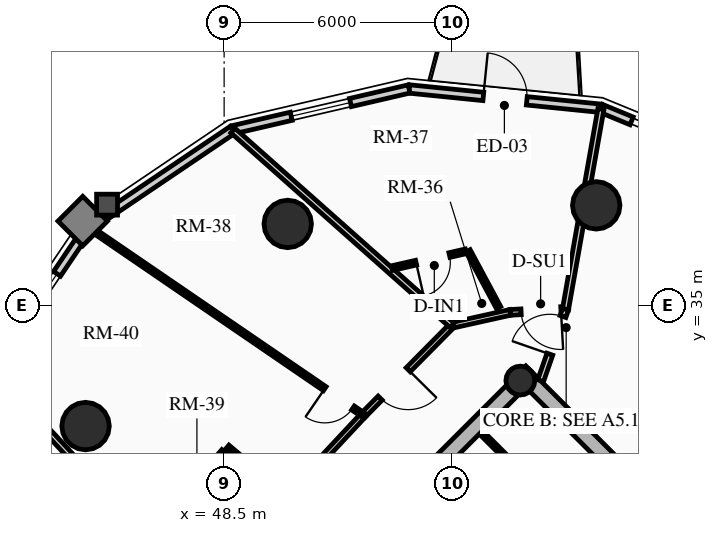
"""IFC4 building model, lengths in metres.
Left out: names, types, materials, properties, quantities, classifications, styles, units other than length and angle.
Written with IfcOpenShell. Run it as: python <this file> out.ifc"""

import sys

from ifc_helpers import new_model, si_unit, direction, frame, frame_2d, origin, origin_2d, place, context, subcontext, project, spatial, rectangle, circle, hollow_circle, extrude, source, transform, mapped, element, fill, save


model = new_model("IFC4")
c1 = context("Model", 3, precision=1e-05, world=origin(), true_north=direction((0.0, 1.0)))
c2 = subcontext(c1, "Body", "Model", "MODEL_VIEW")
j1 = project(units=[si_unit("LENGTHUNIT", "METRE"), si_unit("PLANEANGLEUNIT", "RADIAN")], contexts=[c1])
p1 = place(None, origin())
s1 = spatial("IfcSite", under=j1, at=p1, CompositionType="ELEMENT")
p2 = place(p1, origin())
s2 = spatial("IfcBuilding", under=s1, at=p2, CompositionType="ELEMENT")
p3 = place(p2, frame((0.0, 0.0, 151.6)))
s3 = spatial("IfcBuildingStorey", under=s2, at=p3, CompositionType="ELEMENT", Elevation=151.6)
p4 = place(p3, frame((66.268, 23.298, 0.0), z_axis=(0.0, 0.0, 1.0), x_axis=(-0.707106781187, 0.707106781187, 0.0)))
e1 = element("IfcWall", 1, at=p4, inside=s3, PredefinedType="SHEAR", context=c2, shape_type="SweptSolid", body=[
    extrude(rectangle(XDim=14.1, YDim=0.4, at=frame_2d((7.05, 0.0))), origin(), (0.0, 0.0, 1.0), 2.91),
])
p5 = place(p3, frame((48.873, 25.561, 0.0), z_axis=(0.0, 0.0, 1.0), x_axis=(0.707106781187, 0.707106781187, 0.0)))
e2 = element("IfcWall", 2, at=p5, inside=s3, PredefinedType="SHEAR", context=c2, shape_type="SweptSolid", body=[
    extrude(rectangle(XDim=10.7, YDim=0.4, at=frame_2d((5.35, 0.0))), origin(), (0.0, 0.0, 1.0), 2.91),
])
m1 = source(origin(), c2, "Body", "SweptSolid", [
    extrude(rectangle(XDim=1.5, YDim=2.02, at=frame_2d((0.75, 1.01))), frame((0.0, 0.21, 0.0), z_axis=(0.0, -1.0, 0.0), x_axis=(1.0, 0.0, 0.0)), (0.0, 0.0, 1.0), 0.42),
])
p6 = place(p5, frame((4.6, 0.0, 0.0)))
e3 = element("IfcOpeningElement", 3, at=p6, cuts=e2, PredefinedType="OPENING", context=c2, shape_type="MappedRepresentation", body=[
    mapped(m1, transform((0.0, 0.0, 0.0), x_axis=(1.0, 0.0, 0.0), y_axis=(0.0, 1.0, 0.0), z_axis=(0.0, 0.0, 1.0), scale=1.0)),
])
p7 = place(p3, frame((56.294, 33.024, 0.0), z_axis=(0.0, 0.0, 1.0), x_axis=(0.707106781187, 0.707106781187, 0.0)))
e4 = element("IfcColumn", 4, at=p7, inside=s3, PredefinedType="COLUMN", context=c2, shape_type="SweptSolid", body=[
    extrude(hollow_circle(Radius=0.38, WallThickness=0.032, at=origin_2d()), origin(), (0.0, 0.0, 1.0), 2.91),
])
for number, where, z_axis, x_axis in (
    (5, (58.291, 37.635, 0.0), (0.0, 0.0, 1.0), (1.0, 0.0, 0.0)),
    (6, (50.173, 37.146, 0.0), (0.0, 0.0, 1.0), (1.0, 0.0, 0.0)),
    (7, (44.854, 31.827, 0.0), (0.0, 0.0, 1.0), (1.0, 0.0, 0.0)),
):
    element("IfcColumn", number, at=place(p3, frame(where, z_axis=z_axis, x_axis=x_axis)), inside=s3, PredefinedType="USERDEFINED", context=c2, shape_type="SweptSolid", body=[
        extrude(circle(Radius=0.625, at=origin_2d()), origin(), (0.0, 0.0, 1.0), 2.91),
    ])
p8 = place(p3, frame((58.418, 40.189, 0.0), z_axis=(0.0, 0.0, 1.0), x_axis=(0.924556017656, -0.381046152345, 0.0)))
e8 = element("IfcWall", 8, at=p8, inside=s3, PredefinedType="SOLIDWALL", context=c2, shape_type="SweptSolid", body=[
    extrude(rectangle(XDim=0.87, YDim=0.22, at=frame_2d((0.435, 0.0))), origin(), (0.0, 0.0, 1.0), 2.245),
])
p9 = place(p3, frame((53.367, 40.698, 0.0), z_axis=(0.0, 0.0, 1.0), x_axis=(0.994959267396, -0.100279889424, 0.0)))
e9 = element("IfcWall", 9, at=p9, inside=s3, PredefinedType="SOLIDWALL", context=c2, shape_type="SweptSolid", body=[
    extrude(rectangle(XDim=5.076, YDim=0.22, at=frame_2d((2.538, 0.0))), origin(), (0.0, 0.0, 1.0), 2.245),
])
m2 = source(origin(), c2, "Body", "SweptSolid", [
    extrude(rectangle(XDim=1.15, YDim=2.005, at=frame_2d((0.575, 1.002))), frame((0.0, 0.12, 0.0), z_axis=(0.0, -1.0, 0.0), x_axis=(1.0, 0.0, 0.0)), (0.0, 0.0, 1.0), 0.24),
])
p10 = place(p9, frame((1.963, 0.0, 0.0)))
e10 = element("IfcOpeningElement", 10, at=p10, cuts=e9, PredefinedType="OPENING", context=c2, shape_type="MappedRepresentation", body=[
    mapped(m2, transform((0.0, 0.0, 0.0), x_axis=(1.0, 0.0, 0.0), y_axis=(0.0, 1.0, 0.0), z_axis=(0.0, 0.0, 1.0), scale=1.0)),
])
p11 = place(p3, frame((48.721, 39.622, 0.0), z_axis=(0.0, 0.0, 1.0), x_axis=(0.974206226622, 0.225659540039, 0.0)))
e11 = element("IfcWall", 11, at=p11, inside=s3, PredefinedType="SOLIDWALL", context=c2, shape_type="SweptSolid", body=[
    extrude(rectangle(XDim=4.769, YDim=0.22, at=frame_2d((2.385, 0.0))), origin(), (0.0, 0.0, 1.0), 2.245),
])
m3 = source(origin(), c2, "Body", "SweptSolid", [
    extrude(rectangle(XDim=1.6, YDim=1.3, at=frame_2d((0.8, 0.65))), frame((0.0, 0.12, 0.0), z_axis=(0.0, -1.0, 0.0), x_axis=(1.0, 0.0, 0.0)), (0.0, 0.0, 1.0), 0.24),
])
p12 = place(p11, frame((1.585, 0.0, 0.65)))
e12 = element("IfcOpeningElement", 12, at=p12, cuts=e11, PredefinedType="OPENING", context=c2, shape_type="MappedRepresentation", body=[
    mapped(m3, transform((0.0, 0.0, 0.0), x_axis=(1.0, 0.0, 0.0), y_axis=(0.0, 1.0, 0.0), z_axis=(0.0, 0.0, 1.0), scale=1.0)),
])
p13 = place(p3, frame((44.935, 37.065, 0.0), z_axis=(0.0, 0.0, 1.0), x_axis=(0.828739009952, 0.559635286042, 0.0)))
e13 = element("IfcWall", 13, at=p13, inside=s3, PredefinedType="SOLIDWALL", context=c2, shape_type="SweptSolid", body=[
    extrude(rectangle(XDim=4.569, YDim=0.22, at=frame_2d((2.284, 0.0))), origin(), (0.0, 0.0, 1.0), 2.245),
])
p14 = place(p3, frame((42.378, 33.279, 0.0), z_axis=(0.0, 0.0, 1.0), x_axis=(0.559635286042, 0.828739009952, 0.0)))
e14 = element("IfcWall", 14, at=p14, inside=s3, PredefinedType="SOLIDWALL", context=c2, shape_type="SweptSolid", body=[
    extrude(rectangle(XDim=4.569, YDim=0.22, at=frame_2d((2.284, 0.0))), origin(), (0.0, 0.0, 1.0), 2.245),
])
p15 = place(p14, frame((1.484, 0.0, 0.65)))
e15 = element("IfcOpeningElement", 15, at=p15, cuts=e14, PredefinedType="OPENING", context=c2, shape_type="MappedRepresentation", body=[
    mapped(m3, transform((0.0, 0.0, 0.0), x_axis=(1.0, 0.0, 0.0), y_axis=(0.0, 1.0, 0.0), z_axis=(0.0, 0.0, 1.0), scale=1.0)),
])
p16 = place(p3, frame((57.981, 28.941, 0.0), z_axis=(0.0, 0.0, 1.0), x_axis=(-0.707074823725, 0.707138737204, 0.0)))
e16 = element("IfcWall", 16, at=p16, inside=s3, PredefinedType="PARTITIONING", context=c2, shape_type="SweptSolid", body=[
    extrude(rectangle(XDim=3.82, YDim=0.125, at=frame_2d((1.91, 0.0))), origin(), (0.0, 0.0, 1.0), 2.675),
])
m4 = source(origin(), c2, "Body", "SweptSolid", [
    extrude(rectangle(XDim=0.9, YDim=2.005, at=frame_2d((0.45, 1.002))), frame((0.0, 0.073, 0.0), z_axis=(0.0, -1.0, 0.0), x_axis=(1.0, 0.0, 0.0)), (0.0, 0.0, 1.0), 0.145),
])
p17 = place(p16, frame((1.45, 0.0, 0.0)))
e17 = element("IfcOpeningElement", 17, at=p17, cuts=e16, PredefinedType="OPENING", context=c2, shape_type="MappedRepresentation", body=[
    mapped(m4, transform((0.0, 0.0, 0.0), x_axis=(1.0, 0.0, 0.0), y_axis=(0.0, 1.0, 0.0), z_axis=(0.0, 0.0, 1.0), scale=1.0)),
])
p18 = place(p3, frame((57.482, 34.899, 0.0), z_axis=(0.0, 0.0, 1.0), x_axis=(-0.998466026722, -0.055367801852, 0.0)))
e18 = element("IfcWall", 18, at=p18, inside=s3, PredefinedType="PARTITIONING", context=c2, shape_type="SweptSolid", body=[
    extrude(rectangle(XDim=1.455, YDim=0.15, at=frame_2d((0.728, 0.0))), origin(), (0.0, 0.0, 1.0), 2.245),
])
m5 = source(origin(), c2, "Body", "SweptSolid", [
    extrude(rectangle(XDim=1.05, YDim=2.015, at=frame_2d((0.525, 1.007))), frame((0.0, 0.085, 0.0), z_axis=(0.0, -1.0, 0.0), x_axis=(1.0, 0.0, 0.0)), (0.0, 0.0, 1.0), 0.17),
])
p19 = place(p18, frame((0.12, 0.0, 0.0)))
e19 = element("IfcOpeningElement", 19, at=p19, cuts=e18, PredefinedType="OPENING", context=c2, shape_type="MappedRepresentation", body=[
    mapped(m5, transform((0.0, 0.0, 0.0), x_axis=(1.0, 0.0, 0.0), y_axis=(0.0, 1.0, 0.0), z_axis=(0.0, 0.0, 1.0), scale=1.0)),
])
p20 = place(p3, frame((56.029, 34.819, 0.0), z_axis=(0.0, 0.0, 1.0), x_axis=(-0.976117289068, -0.217244189754, 0.0)))
e20 = element("IfcWall", 20, at=p20, inside=s3, PredefinedType="PARTITIONING", context=c2, shape_type="SweptSolid", body=[
    extrude(rectangle(XDim=1.565, YDim=0.15, at=frame_2d((0.783, 0.0))), origin(), (0.0, 0.0, 1.0), 2.245),
])
p21 = place(p3, frame((54.501, 34.479, 0.0), z_axis=(0.0, 0.0, 1.0), x_axis=(-0.70346073929, -0.710734119258, 0.0)))
e21 = element("IfcWall", 21, at=p21, inside=s3, PredefinedType="PARTITIONING", context=c2, shape_type="SweptSolid", body=[
    extrude(rectangle(XDim=3.323, YDim=0.15, at=frame_2d((1.662, 0.0))), origin(), (0.0, 0.0, 1.0), 2.245),
])
p22 = place(p21, frame((1.645, 0.0, 0.0)))
e22 = element("IfcOpeningElement", 22, at=p22, cuts=e21, PredefinedType="OPENING", context=c2, shape_type="MappedRepresentation", body=[
    mapped(m5, transform((0.0, 0.0, 0.0), x_axis=(1.0, 0.0, 0.0), y_axis=(0.0, 1.0, 0.0), z_axis=(0.0, 0.0, 1.0), scale=1.0)),
])
p23 = place(p3, frame((52.163, 32.117, 0.0), z_axis=(0.0, 0.0, 1.0), x_axis=(-0.682485296115, -0.730899323154, 0.0)))
e23 = element("IfcWall", 23, at=p23, inside=s3, PredefinedType="PARTITIONING", context=c2, shape_type="SweptSolid", body=[
    extrude(rectangle(XDim=6.404, YDim=0.15, at=frame_2d((3.202, 0.0))), origin(), (0.0, 0.0, 1.0), 2.245),
])
p24 = place(p3, frame((57.482, 34.899, 0.0), z_axis=(0.0, 0.0, 1.0), x_axis=(0.174251112754, 0.98470124896, 0.0)))
e24 = element("IfcWall", 24, at=p24, inside=s3, PredefinedType="PARTITIONING", context=c2, shape_type="SweptSolid", body=[
    extrude(rectangle(XDim=5.352, YDim=0.16, at=frame_2d((2.676, 0.0))), origin(), (0.0, 0.0, 1.0), 2.245),
])
p25 = place(p3, frame((54.501, 34.479, 0.0), z_axis=(0.0, 0.0, 1.0), x_axis=(-0.747641382601, 0.66410267506, 0.0)))
e25 = element("IfcWall", 25, at=p25, inside=s3, PredefinedType="PARTITIONING", context=c2, shape_type="SweptSolid", body=[
    extrude(rectangle(XDim=7.718, YDim=0.16, at=frame_2d((3.859, 0.0))), origin(), (0.0, 0.0, 1.0), 2.245),
])
p26 = place(p3, frame((47.792, 27.436, 0.0), z_axis=(0.0, 0.0, 1.0), x_axis=(-0.679077160958, 0.734066897132, 0.0)))
e26 = element("IfcWall", 26, at=p26, inside=s3, PredefinedType="PARTITIONING", context=c2, shape_type="SweptSolid", body=[
    extrude(rectangle(XDim=7.947, YDim=0.16, at=frame_2d((3.974, 0.0))), origin(), (0.0, 0.0, 1.0), 2.245),
])
p27 = place(p3, frame((56.828, 33.021, 0.0), z_axis=(0.0, 0.0, 1.0), x_axis=(0.328682472103, 0.944440486496, 0.0)))
e27 = element("IfcWall", 27, at=p27, inside=s3, PredefinedType="PARTITIONING", context=c2, shape_type="SweptSolid", body=[
    extrude(rectangle(XDim=1.989, YDim=0.16, at=frame_2d((0.995, 0.0))), origin(), (0.0, 0.0, 1.0), 2.245),
])
m6 = source(origin(), c2, "Body", "SweptSolid", [
    extrude(rectangle(XDim=1.05, YDim=2.015, at=frame_2d((0.525, 1.007))), frame((0.0, 0.09, 0.0), z_axis=(0.0, -1.0, 0.0), x_axis=(1.0, 0.0, 0.0)), (0.0, 0.0, 1.0), 0.18),
])
p28 = place(p27, frame((0.739, 0.0, 0.0)))
e28 = element("IfcOpeningElement", 28, at=p28, cuts=e27, PredefinedType="OPENING", context=c2, shape_type="MappedRepresentation", body=[
    mapped(m6, transform((0.0, 0.0, 0.0), x_axis=(1.0, 0.0, 0.0), y_axis=(0.0, 1.0, 0.0), z_axis=(0.0, 0.0, 1.0), scale=1.0)),
])
p29 = place(p3, frame((55.722, 34.944, 0.0), z_axis=(0.0, 0.0, 1.0), x_axis=(-0.473482169178, 0.880803403417, 0.0)))
e29 = element("IfcWall", 29, at=p29, inside=s3, PredefinedType="PARTITIONING", context=c2, shape_type="SweptSolid", body=[
    extrude(rectangle(XDim=1.698, YDim=0.125, at=frame_2d((0.849, 0.0))), origin(), (0.0, 0.0, 1.0), 2.245),
])
p30 = place(p3, frame((54.858, 36.425, 0.0), z_axis=(0.0, 0.0, 1.0), x_axis=(-0.975061820415, -0.221933427785, 0.0)))
e30 = element("IfcWall", 30, at=p30, inside=s3, PredefinedType="PARTITIONING", context=c2, shape_type="SweptSolid", body=[
    extrude(rectangle(XDim=1.993, YDim=0.125, at=frame_2d((0.997, 0.0))), origin(), (0.0, 0.0, 1.0), 2.312),
])
p31 = place(p30, frame((0.44, 0.0, 0.0)))
e31 = element("IfcOpeningElement", 31, at=p31, cuts=e30, PredefinedType="OPENING", context=c2, shape_type="MappedRepresentation", body=[
    mapped(m4, transform((0.0, 0.0, 0.0), x_axis=(1.0, 0.0, 0.0), y_axis=(0.0, 1.0, 0.0), z_axis=(0.0, 0.0, 1.0), scale=1.0)),
])
p32 = place(p3, frame((52.163, 32.117, 0.0), z_axis=(0.0, 0.0, 1.0), x_axis=(-0.825403853282, 0.564542716707, 0.0)))
e32 = element("IfcWall", 32, at=p32, inside=s3, PredefinedType="PARTITIONING", context=c2, shape_type="SweptSolid", body=[
    extrude(rectangle(XDim=8.74, YDim=0.125, at=frame_2d((4.37, 0.0))), origin(), (0.0, 0.0, 1.0), 2.245),
])
p33 = place(p32, frame((0.33, 0.0, 0.0)))
e33 = element("IfcOpeningElement", 33, at=p33, cuts=e32, PredefinedType="OPENING", context=c2, shape_type="MappedRepresentation", body=[
    mapped(m4, transform((0.0, 0.0, 0.0), x_axis=(1.0, 0.0, 0.0), y_axis=(0.0, 1.0, 0.0), z_axis=(0.0, 0.0, 1.0), scale=1.0)),
])
p34 = place(p3, frame((49.961, 30.124, 0.0), z_axis=(0.0, 0.0, 1.0), x_axis=(-0.766210982885, 0.64258908309, 0.0)))
e34 = element("IfcWall", 34, at=p34, inside=s3, PredefinedType="PARTITIONING", context=c2, shape_type="SweptSolid", body=[
    extrude(rectangle(XDim=1.795, YDim=0.125, at=frame_2d((0.897, 0.0))), origin(), (0.0, 0.0, 1.0), 2.675),
])
p35 = place(p3, frame((48.488, 31.166, 0.0), z_axis=(0.0, 0.0, 1.0), x_axis=(-0.660635615229, -0.750706722956, 0.0)))
e35 = element("IfcWall", 35, at=p35, inside=s3, PredefinedType="PARTITIONING", context=c2, shape_type="SweptSolid", body=[
    extrude(rectangle(XDim=2.852, YDim=0.125, at=frame_2d((1.426, 0.0))), origin(), (0.0, 0.0, 1.0), 2.245),
])
p36 = place(p35, frame((0.12, 0.0, 0.0)))
e36 = element("IfcOpeningElement", 36, at=p36, cuts=e35, PredefinedType="OPENING", context=c2, shape_type="MappedRepresentation", body=[
    mapped(m4, transform((0.0, 0.0, 0.0), x_axis=(1.0, 0.0, 0.0), y_axis=(0.0, 1.0, 0.0), z_axis=(0.0, 0.0, 1.0), scale=1.0)),
])
m7 = source(origin(), c2, "Body", "SweptSolid", [
    extrude(rectangle(XDim=1.15, YDim=2.005, at=frame_2d((0.575, 1.002))), frame((0.0, 0.025, 0.0), z_axis=(0.0, -1.0, 0.0), x_axis=(1.0, 0.0, 0.0)), (0.0, 0.0, 1.0), 0.05),
])
p37 = place(p10, origin())
e37 = element("IfcDoor", 37, at=p37, inside=s3, OperationType="SINGLE_SWING_LEFT", PredefinedType="DOOR", context=c2, shape_type="MappedRepresentation", body=[
    mapped(m7, transform((0.0, 0.0, 0.0), x_axis=(1.0, 0.0, 0.0), y_axis=(0.0, 1.0, 0.0), z_axis=(0.0, 0.0, 1.0), scale=1.0)),
])
fill(e10, e37)
m8 = source(origin(), c2, "Body", "SweptSolid", [
    extrude(rectangle(XDim=1.6, YDim=1.3, at=frame_2d((0.8, 0.65))), frame((0.0, 0.03, 0.0), z_axis=(0.0, -1.0, 0.0), x_axis=(1.0, 0.0, 0.0)), (0.0, 0.0, 1.0), 0.06),
])
p38 = place(p12, origin())
e38 = element("IfcWindow", 38, at=p38, inside=s3, PartitioningType="SINGLE_PANEL", PredefinedType="WINDOW", context=c2, shape_type="MappedRepresentation", body=[
    mapped(m8, transform((0.0, 0.0, 0.0), x_axis=(1.0, 0.0, 0.0), y_axis=(0.0, 1.0, 0.0), z_axis=(0.0, 0.0, 1.0), scale=1.0)),
])
fill(e12, e38)
p39 = place(p15, origin())
e39 = element("IfcWindow", 39, at=p39, inside=s3, PartitioningType="SINGLE_PANEL", PredefinedType="WINDOW", context=c2, shape_type="MappedRepresentation", body=[
    mapped(m8, transform((0.0, 0.0, 0.0), x_axis=(1.0, 0.0, 0.0), y_axis=(0.0, 1.0, 0.0), z_axis=(0.0, 0.0, 1.0), scale=1.0)),
])
fill(e15, e39)
m9 = source(origin(), c2, "Body", "SweptSolid", [
    extrude(rectangle(XDim=1.05, YDim=2.015, at=frame_2d((0.525, 1.007))), frame((0.0, 0.025, 0.0), z_axis=(0.0, -1.0, 0.0), x_axis=(1.0, 0.0, 0.0)), (0.0, 0.0, 1.0), 0.05),
])
p40 = place(p28, origin())
e40 = element("IfcDoor", 40, at=p40, inside=s3, OperationType="SINGLE_SWING_LEFT", PredefinedType="DOOR", context=c2, shape_type="MappedRepresentation", body=[
    mapped(m9, transform((0.0, 0.0, 0.0), x_axis=(1.0, 0.0, 0.0), y_axis=(0.0, 1.0, 0.0), z_axis=(0.0, 0.0, 1.0), scale=1.0)),
])
fill(e28, e40)
p41 = place(p19, origin())
e41 = element("IfcDoor", 41, at=p41, inside=s3, OperationType="SINGLE_SWING_LEFT", PredefinedType="DOOR", context=c2, shape_type="MappedRepresentation", body=[
    mapped(m9, transform((0.0, 0.0, 0.0), x_axis=(1.0, 0.0, 0.0), y_axis=(0.0, 1.0, 0.0), z_axis=(0.0, 0.0, 1.0), scale=1.0)),
])
fill(e19, e41)
m10 = source(origin(), c2, "Body", "SweptSolid", [
    extrude(rectangle(XDim=0.9, YDim=2.005, at=frame_2d((0.45, 1.002))), frame((0.0, 0.025, 0.0), z_axis=(0.0, -1.0, 0.0), x_axis=(1.0, 0.0, 0.0)), (0.0, 0.0, 1.0), 0.05),
])
p42 = place(p31, origin())
e42 = element("IfcDoor", 42, at=p42, inside=s3, OperationType="SINGLE_SWING_RIGHT", PredefinedType="DOOR", context=c2, shape_type="MappedRepresentation", body=[
    mapped(m10, transform((0.0, 0.0, 0.0), x_axis=(1.0, 0.0, 0.0), y_axis=(0.0, 1.0, 0.0), z_axis=(0.0, 0.0, 1.0), scale=1.0)),
])
fill(e31, e42)
p43 = place(p22, origin())
e43 = element("IfcDoor", 43, at=p43, inside=s3, OperationType="SINGLE_SWING_LEFT", PredefinedType="DOOR", context=c2, shape_type="MappedRepresentation", body=[
    mapped(m9, transform((0.0, 0.0, 0.0), x_axis=(1.0, 0.0, 0.0), y_axis=(0.0, 1.0, 0.0), z_axis=(0.0, 0.0, 1.0), scale=1.0)),
])
fill(e22, e43)
p44 = place(p33, origin())
e44 = element("IfcDoor", 44, at=p44, inside=s3, OperationType="SINGLE_SWING_RIGHT", PredefinedType="DOOR", context=c2, shape_type="MappedRepresentation", body=[
    mapped(m10, transform((0.0, 0.0, 0.0), x_axis=(1.0, 0.0, 0.0), y_axis=(0.0, 1.0, 0.0), z_axis=(0.0, 0.0, 1.0), scale=1.0)),
])
fill(e33, e44)
save(model, sys.argv[1])
